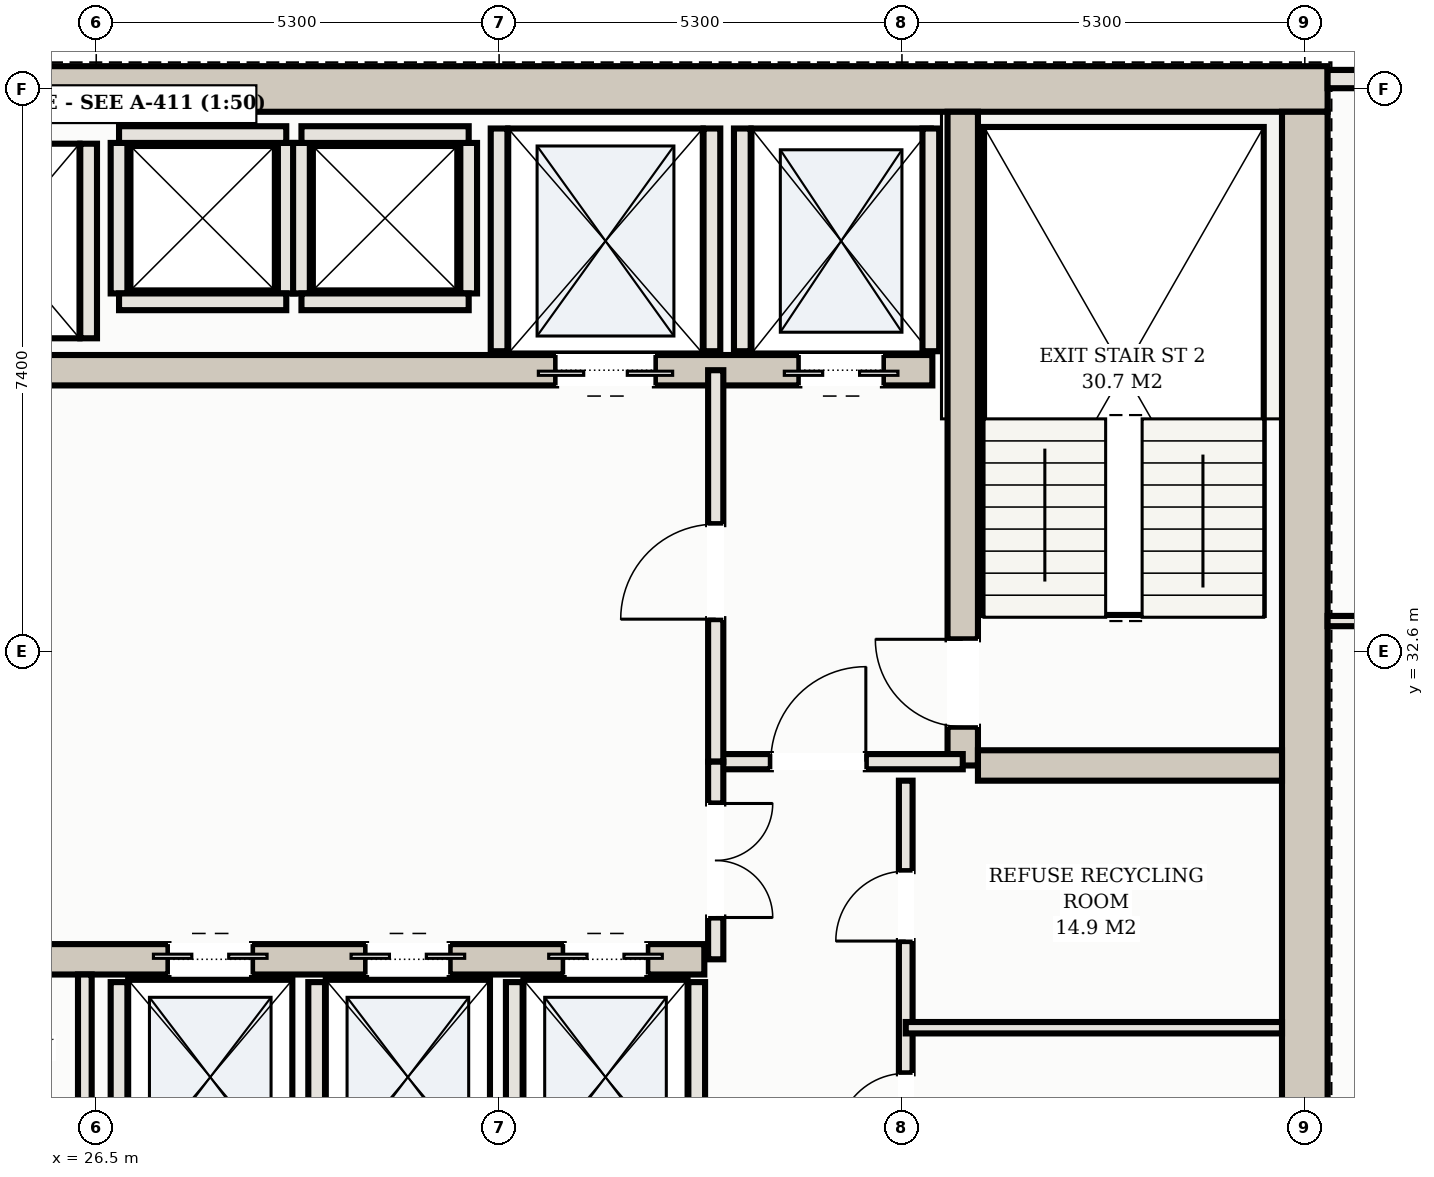
"""IFC4 building model, lengths in metres.
Left out: names, types, materials, properties, quantities, classifications, styles, units other than length and angle.
Written with IfcOpenShell. Run it as: python <this file> out.ifc"""

import sys

from ifc_helpers import new_model, si_unit, direction, frame, frame_2d, origin, place, context, subcontext, project, spatial, rectangle, extrude, element, fill, save


model = new_model("IFC4")
c1 = context("Model", 3, precision=1e-05, world=origin(), true_north=direction((0.0, 1.0)))
c2 = subcontext(c1, "Body", "Model", "MODEL_VIEW")
j1 = project(units=[si_unit("LENGTHUNIT", "METRE"), si_unit("PLANEANGLEUNIT", "RADIAN")], contexts=[c1])
p1 = place(None, origin())
s1 = spatial("IfcSite", under=j1, at=p1, CompositionType="ELEMENT")
p2 = place(p1, origin())
s2 = spatial("IfcBuilding", under=s1, at=p2, CompositionType="ELEMENT")
p3 = place(p2, frame((0.0, 0.0, 182.1)))
s3 = spatial("IfcBuildingStorey", under=s2, at=p3, CompositionType="ELEMENT", Elevation=182.1)
p4 = place(p3, frame((10.3, 40.0, 0.0), z_axis=(0.0, 0.0, 1.0), x_axis=(1.0, 0.0, 0.0)))
e1 = element("IfcWall", 1, at=p4, inside=s3, PredefinedType="SHEAR", context=c2, shape_type="SweptSolid", body=[
    extrude(rectangle(XDim=32.4, YDim=0.6, at=frame_2d((16.2, 0.0))), origin(), (0.0, 0.0, 1.0), 3.03),
])
p5 = place(p3, frame((42.4, 25.5, 0.0), z_axis=(0.0, 0.0, 1.0), x_axis=(0.0, 1.0, 0.0)))
e2 = element("IfcWall", 2, at=p5, inside=s3, PredefinedType="SHEAR", context=c2, shape_type="SweptSolid", body=[
    extrude(rectangle(XDim=14.2, YDim=0.6, at=frame_2d((7.1, 0.0))), origin(), (0.0, 0.0, 1.0), 3.03),
])
p6 = place(p3, frame((37.9, 31.1, 0.0), z_axis=(0.0, 0.0, 1.0), x_axis=(0.0, 1.0, 0.0)))
e3 = element("IfcWall", 3, at=p6, inside=s3, PredefinedType="SHEAR", context=c2, shape_type="SweptSolid", body=[
    extrude(rectangle(XDim=8.6, YDim=0.4, at=frame_2d((4.3, 0.0))), origin(), (0.0, 0.0, 1.0), 3.03),
])
p7 = place(p6, frame((0.51, 0.0, 0.0)))
e4 = element("IfcOpeningElement", 4, at=p7, cuts=e3, PredefinedType="OPENING", context=c2, shape_type="SweptSolid", body=[
    extrude(rectangle(XDim=1.15, YDim=2.2, at=frame_2d((0.575, 1.1))), frame((0.0, 0.21, 0.0), z_axis=(0.0, -1.0, 0.0), x_axis=(1.0, 0.0, 0.0)), (0.0, 0.0, 1.0), 0.42),
])
p8 = place(p3, frame((38.1, 31.1, 0.0), z_axis=(0.0, 0.0, 1.0), x_axis=(1.0, 0.0, 0.0)))
e5 = element("IfcWall", 5, at=p8, inside=s3, PredefinedType="SHEAR", context=c2, shape_type="SweptSolid", body=[
    extrude(rectangle(XDim=4.0, YDim=0.4, at=frame_2d((2.0, 0.0))), origin(), (0.0, 0.0, 1.0), 3.03),
])
p9 = place(p3, frame((15.5, 36.3, 0.0), z_axis=(0.0, 0.0, 1.0), x_axis=(1.0, 0.0, 0.0)))
e6 = element("IfcWall", 6, at=p9, inside=s3, PredefinedType="SHEAR", context=c2, shape_type="SweptSolid", body=[
    extrude(rectangle(XDim=22.0, YDim=0.4, at=frame_2d((11.0, 0.0))), origin(), (0.0, 0.0, 1.0), 3.03),
])
p10 = place(p9, frame((0.65, 0.0, 0.0)))
e7 = element("IfcOpeningElement", 7, at=p10, cuts=e6, PredefinedType="OPENING", context=c2, shape_type="SweptSolid", body=[
    extrude(rectangle(XDim=1.1, YDim=2.15, at=frame_2d((0.55, 1.075))), frame((0.0, 0.21, 0.0), z_axis=(0.0, -1.0, 0.0), x_axis=(1.0, 0.0, 0.0)), (0.0, 0.0, 1.0), 0.42),
])
p11 = place(p9, frame((20.25, 0.0, 0.0)))
e8 = element("IfcOpeningElement", 8, at=p11, cuts=e6, PredefinedType="OPENING", context=c2, shape_type="SweptSolid", body=[
    extrude(rectangle(XDim=1.1, YDim=2.15, at=frame_2d((0.55, 1.075))), frame((0.0, 0.21, 0.0), z_axis=(0.0, -1.0, 0.0), x_axis=(1.0, 0.0, 0.0)), (0.0, 0.0, 1.0), 0.42),
])
p12 = place(p9, frame((17.05, 0.0, 0.0)))
e9 = element("IfcOpeningElement", 9, at=p12, cuts=e6, PredefinedType="OPENING", context=c2, shape_type="SweptSolid", body=[
    extrude(rectangle(XDim=1.3, YDim=2.2, at=frame_2d((0.65, 1.1))), frame((0.0, 0.21, 0.0), z_axis=(0.0, -1.0, 0.0), x_axis=(1.0, 0.0, 0.0)), (0.0, 0.0, 1.0), 0.42),
])
p13 = place(p3, frame((18.5, 28.55, 0.0), z_axis=(0.0, 0.0, 1.0), x_axis=(1.0, 0.0, 0.0)))
e10 = element("IfcWall", 10, at=p13, inside=s3, PredefinedType="SHEAR", context=c2, shape_type="SweptSolid", body=[
    extrude(rectangle(XDim=16.0, YDim=0.4, at=frame_2d((8.0, 0.0))), origin(), (0.0, 0.0, 1.0), 3.03),
])
p14 = place(p13, frame((8.95, 0.0, 0.0)))
e11 = element("IfcOpeningElement", 11, at=p14, cuts=e10, PredefinedType="OPENING", context=c2, shape_type="SweptSolid", body=[
    extrude(rectangle(XDim=1.1, YDim=2.15, at=frame_2d((0.55, 1.075))), frame((0.0, 0.21, 0.0), z_axis=(0.0, -1.0, 0.0), x_axis=(1.0, 0.0, 0.0)), (0.0, 0.0, 1.0), 0.42),
])
p15 = place(p13, frame((11.55, 0.0, 0.0)))
e12 = element("IfcOpeningElement", 12, at=p15, cuts=e10, PredefinedType="OPENING", context=c2, shape_type="SweptSolid", body=[
    extrude(rectangle(XDim=1.1, YDim=2.15, at=frame_2d((0.55, 1.075))), frame((0.0, 0.21, 0.0), z_axis=(0.0, -1.0, 0.0), x_axis=(1.0, 0.0, 0.0)), (0.0, 0.0, 1.0), 0.42),
])
p16 = place(p13, frame((14.15, 0.0, 0.0)))
e13 = element("IfcOpeningElement", 13, at=p16, cuts=e10, PredefinedType="OPENING", context=c2, shape_type="SweptSolid", body=[
    extrude(rectangle(XDim=1.1, YDim=2.15, at=frame_2d((0.55, 1.075))), frame((0.0, 0.21, 0.0), z_axis=(0.0, -1.0, 0.0), x_axis=(1.0, 0.0, 0.0)), (0.0, 0.0, 1.0), 0.42),
])
for number, where, z_axis, x_axis in (
    (14, (35.0, 36.55, 0.0), (0.0, 0.0, 1.0), (0.0, 1.0, 0.0)),
    (15, (37.48, 36.55, 0.0), (0.0, 0.0, 1.0), (0.0, 1.0, 0.0)),
    (16, (31.8, 36.55, 0.0), (0.0, 0.0, 1.0), (0.0, 1.0, 0.0)),
    (17, (34.6, 36.55, 0.0), (0.0, 0.0, 1.0), (0.0, 1.0, 0.0)),
):
    element("IfcWall", number, at=place(p3, frame(where, z_axis=z_axis, x_axis=x_axis)), inside=s3, PredefinedType="SOLIDWALL", context=c2, shape_type="SweptSolid", body=[
        extrude(rectangle(XDim=2.93, YDim=0.22, at=frame_2d((1.465, 0.0))), origin(), (0.0, 0.0, 1.0), 3.03),
    ])
for number, where, z_axis, x_axis in (
    (18, (26.8, 25.72, 0.0), (0.0, 0.0, 1.0), (0.0, 1.0, 0.0)),
    (19, (29.4, 25.72, 0.0), (0.0, 0.0, 1.0), (0.0, 1.0, 0.0)),
    (20, (32.0, 25.72, 0.0), (0.0, 0.0, 1.0), (0.0, 1.0, 0.0)),
    (21, (34.4, 25.72, 0.0), (0.0, 0.0, 1.0), (0.0, 1.0, 0.0)),
):
    element("IfcWall", number, at=place(p3, frame(where, z_axis=z_axis, x_axis=x_axis)), inside=s3, PredefinedType="SOLIDWALL", context=c2, shape_type="SweptSolid", body=[
        extrude(rectangle(XDim=2.53, YDim=0.22, at=frame_2d((1.265, 0.0))), origin(), (0.0, 0.0, 1.0), 3.03),
    ])
p17 = place(p3, frame((26.4, 36.72, 0.0), z_axis=(0.0, 0.0, 1.0), x_axis=(0.0, 1.0, 0.0)))
e22 = element("IfcWall", 22, at=p17, inside=s3, PredefinedType="SOLIDWALL", context=c2, shape_type="SweptSolid", body=[
    extrude(rectangle(XDim=2.56, YDim=0.22, at=frame_2d((1.28, 0.0))), origin(), (0.0, 0.0, 1.0), 3.03),
])
for number, where, z_axis, x_axis in (
    (23, (26.8, 37.31, 0.0), (0.0, 0.0, 1.0), (0.0, 1.0, 0.0)),
    (24, (29.0, 37.31, 0.0), (0.0, 0.0, 1.0), (0.0, 1.0, 0.0)),
):
    element("IfcWall", number, at=place(p3, frame(where, z_axis=z_axis, x_axis=x_axis)), inside=s3, PredefinedType="SOLIDWALL", context=c2, shape_type="SweptSolid", body=[
        extrude(rectangle(XDim=1.98, YDim=0.22, at=frame_2d((0.99, 0.0))), origin(), (0.0, 0.0, 1.0), 3.03),
    ])
for number, where, z_axis, x_axis in (
    (25, (26.8, 39.4, 0.0), (0.0, 0.0, 1.0), (1.0, 0.0, 0.0)),
    (26, (26.8, 37.2, 0.0), (0.0, 0.0, 1.0), (1.0, 0.0, 0.0)),
):
    element("IfcWall", number, at=place(p3, frame(where, z_axis=z_axis, x_axis=x_axis)), inside=s3, PredefinedType="SOLIDWALL", context=c2, shape_type="SweptSolid", body=[
        extrude(rectangle(XDim=2.2, YDim=0.22, at=frame_2d((1.1, 0.0))), origin(), (0.0, 0.0, 1.0), 3.03),
    ])
for number, where, z_axis, x_axis in (
    (27, (29.2, 37.31, 0.0), (0.0, 0.0, 1.0), (0.0, 1.0, 0.0)),
    (28, (31.4, 37.31, 0.0), (0.0, 0.0, 1.0), (0.0, 1.0, 0.0)),
):
    element("IfcWall", number, at=place(p3, frame(where, z_axis=z_axis, x_axis=x_axis)), inside=s3, PredefinedType="SOLIDWALL", context=c2, shape_type="SweptSolid", body=[
        extrude(rectangle(XDim=1.98, YDim=0.22, at=frame_2d((0.99, 0.0))), origin(), (0.0, 0.0, 1.0), 3.03),
    ])
for number, where, z_axis, x_axis in (
    (29, (29.2, 39.4, 0.0), (0.0, 0.0, 1.0), (1.0, 0.0, 0.0)),
    (30, (29.2, 37.2, 0.0), (0.0, 0.0, 1.0), (1.0, 0.0, 0.0)),
):
    element("IfcWall", number, at=place(p3, frame(where, z_axis=z_axis, x_axis=x_axis)), inside=s3, PredefinedType="SOLIDWALL", context=c2, shape_type="SweptSolid", body=[
        extrude(rectangle(XDim=2.2, YDim=0.22, at=frame_2d((1.1, 0.0))), origin(), (0.0, 0.0, 1.0), 3.03),
    ])
p18 = place(p3, frame((44.35, 40.13, 0.0), z_axis=(0.0, 0.0, 1.0), x_axis=(-1.0, 0.0, 0.0)))
e31 = element("IfcWall", 31, at=p18, inside=s3, PredefinedType="SOLIDWALL", context=c2, shape_type="SweptSolid", body=[
    extrude(rectangle(XDim=1.65, YDim=0.24, at=frame_2d((0.825, 0.0))), origin(), (0.0, 0.0, 1.0), 3.03),
])
p19 = place(p3, frame((34.65, 31.15, 0.0), z_axis=(0.0, 0.0, 1.0), x_axis=(1.0, 0.0, 0.0)))
e32 = element("IfcWall", 32, at=p19, inside=s3, PredefinedType="PARTITIONING", context=c2, shape_type="SweptSolid", body=[
    extrude(rectangle(XDim=3.25, YDim=0.2, at=frame_2d((1.625, 0.0))), origin(), (0.0, 0.0, 1.0), 2.57),
])
p20 = place(p19, frame((0.725, 0.0, 0.0)))
e33 = element("IfcOpeningElement", 33, at=p20, cuts=e32, PredefinedType="OPENING", context=c2, shape_type="SweptSolid", body=[
    extrude(rectangle(XDim=1.25, YDim=2.2, at=frame_2d((0.625, 1.1))), frame((0.0, 0.11, 0.0), z_axis=(0.0, -1.0, 0.0), x_axis=(1.0, 0.0, 0.0)), (0.0, 0.0, 1.0), 0.22),
])
p21 = place(p3, frame((34.65, 31.15, 0.0), z_axis=(0.0, 0.0, 1.0), x_axis=(0.0, 1.0, 0.0)))
e34 = element("IfcWall", 34, at=p21, inside=s3, PredefinedType="PARTITIONING", context=c2, shape_type="SweptSolid", body=[
    extrude(rectangle(XDim=5.15, YDim=0.2, at=frame_2d((2.575, 0.0))), origin(), (0.0, 0.0, 1.0), 2.57),
])
p22 = place(p21, frame((1.875, 0.0, 0.0)))
e35 = element("IfcOpeningElement", 35, at=p22, cuts=e34, PredefinedType="OPENING", context=c2, shape_type="SweptSolid", body=[
    extrude(rectangle(XDim=1.25, YDim=2.2, at=frame_2d((0.625, 1.1))), frame((0.0, 0.11, 0.0), z_axis=(0.0, -1.0, 0.0), x_axis=(1.0, 0.0, 0.0)), (0.0, 0.0, 1.0), 0.22),
])
p23 = place(p3, frame((37.15, 25.5, 0.0), z_axis=(0.0, 0.0, 1.0), x_axis=(0.0, 1.0, 0.0)))
e36 = element("IfcWall", 36, at=p23, inside=s3, PredefinedType="PARTITIONING", context=c2, shape_type="SweptSolid", body=[
    extrude(rectangle(XDim=5.4, YDim=0.18, at=frame_2d((2.7, 0.0))), origin(), (0.0, 0.0, 1.0), 2.57),
])
p24 = place(p23, frame((0.65, 0.0, 0.0)))
e37 = element("IfcOpeningElement", 37, at=p24, cuts=e36, PredefinedType="OPENING", context=c2, shape_type="SweptSolid", body=[
    extrude(rectangle(XDim=0.9, YDim=2.15, at=frame_2d((0.45, 1.075))), frame((0.0, 0.1, 0.0), z_axis=(0.0, -1.0, 0.0), x_axis=(1.0, 0.0, 0.0)), (0.0, 0.0, 1.0), 0.2),
])
p25 = place(p23, frame((3.29, 0.0, 0.0)))
e38 = element("IfcOpeningElement", 38, at=p25, cuts=e36, PredefinedType="OPENING", context=c2, shape_type="SweptSolid", body=[
    extrude(rectangle(XDim=0.92, YDim=2.15, at=frame_2d((0.46, 1.075))), frame((0.0, 0.1, 0.0), z_axis=(0.0, -1.0, 0.0), x_axis=(1.0, 0.0, 0.0)), (0.0, 0.0, 1.0), 0.2),
])
p26 = place(p3, frame((37.15, 27.65, 0.0), z_axis=(0.0, 0.0, 1.0), x_axis=(1.0, 0.0, 0.0)))
e39 = element("IfcWall", 39, at=p26, inside=s3, PredefinedType="PARTITIONING", context=c2, shape_type="SweptSolid", body=[
    extrude(rectangle(XDim=4.95, YDim=0.15, at=frame_2d((2.475, 0.0))), origin(), (0.0, 0.0, 1.0), 2.57),
])
p27 = place(p3, frame((34.65, 28.55, 0.0), z_axis=(0.0, 0.0, 1.0), x_axis=(0.0, 1.0, 0.0)))
e40 = element("IfcWall", 40, at=p27, inside=s3, PredefinedType="PARTITIONING", context=c2, shape_type="SweptSolid", body=[
    extrude(rectangle(XDim=2.6, YDim=0.2, at=frame_2d((1.3, 0.0))), origin(), (0.0, 0.0, 1.0), 2.57),
])
p28 = place(p27, frame((0.55, 0.0, 0.0)))
e41 = element("IfcOpeningElement", 41, at=p28, cuts=e40, PredefinedType="OPENING", context=c2, shape_type="SweptSolid", body=[
    extrude(rectangle(XDim=1.5, YDim=2.25, at=frame_2d((0.75, 1.125))), frame((0.0, 0.11, 0.0), z_axis=(0.0, -1.0, 0.0), x_axis=(1.0, 0.0, 0.0)), (0.0, 0.0, 1.0), 0.22),
])
p29 = place(p3, frame((26.35, 25.62, 0.0), z_axis=(0.0, 0.0, 1.0), x_axis=(0.0, 1.0, 0.0)))
e42 = element("IfcWall", 42, at=p29, inside=s3, PredefinedType="PARTITIONING", context=c2, shape_type="SweptSolid", body=[
    extrude(rectangle(XDim=2.73, YDim=0.18, at=frame_2d((1.365, 0.0))), origin(), (0.0, 0.0, 1.0), 2.57),
])
p30 = place(p3, frame((42.7, 33.0, 0.0), z_axis=(0.0, 0.0, 1.0), x_axis=(1.0, 0.0, 0.0)))
e43 = element("IfcWall", 43, at=p30, inside=s3, PredefinedType="PARTITIONING", context=c2, shape_type="SweptSolid", body=[
    extrude(rectangle(XDim=5.98, YDim=0.135, at=frame_2d((2.99, 0.0))), origin(), (0.0, 0.0, 1.0), 2.57),
])
p31 = place(p30, frame((2.53, 0.0, 0.0)))
e44 = element("IfcOpeningElement", 44, at=p31, cuts=e43, PredefinedType="OPENING", context=c2, shape_type="SweptSolid", body=[
    extrude(rectangle(XDim=0.92, YDim=2.15, at=frame_2d((0.46, 1.075))), frame((0.0, 0.078, 0.0), z_axis=(0.0, -1.0, 0.0), x_axis=(1.0, 0.0, 0.0)), (0.0, 0.0, 1.0), 0.155),
])
p32 = place(p11, frame((1.1, 0.0, 0.0), z_axis=(0.0, 0.0, 1.0), x_axis=(-1.0, 0.0, 0.0)))
e45 = element("IfcDoor", 45, at=p32, inside=s3, OperationType="DOUBLE_DOOR_SLIDING", PredefinedType="DOOR", context=c2, shape_type="SweptSolid", body=[
    extrude(rectangle(XDim=1.1, YDim=2.15, at=frame_2d((0.55, 1.075))), frame((0.0, 0.025, 0.0), z_axis=(0.0, -1.0, 0.0), x_axis=(1.0, 0.0, 0.0)), (0.0, 0.0, 1.0), 0.05),
])
fill(e8, e45)
p33 = place(p12, frame((1.3, 0.0, 0.0), z_axis=(0.0, 0.0, 1.0), x_axis=(-1.0, 0.0, 0.0)))
e46 = element("IfcDoor", 46, at=p33, inside=s3, OperationType="DOUBLE_DOOR_SLIDING", PredefinedType="DOOR", context=c2, shape_type="SweptSolid", body=[
    extrude(rectangle(XDim=1.3, YDim=2.2, at=frame_2d((0.65, 1.1))), frame((0.0, 0.025, 0.0), z_axis=(0.0, -1.0, 0.0), x_axis=(1.0, 0.0, 0.0)), (0.0, 0.0, 1.0), 0.05),
])
fill(e9, e46)
p34 = place(p14, origin())
e47 = element("IfcDoor", 47, at=p34, inside=s3, OperationType="DOUBLE_DOOR_SLIDING", PredefinedType="DOOR", context=c2, shape_type="SweptSolid", body=[
    extrude(rectangle(XDim=1.1, YDim=2.15, at=frame_2d((0.55, 1.075))), frame((0.0, 0.025, 0.0), z_axis=(0.0, -1.0, 0.0), x_axis=(1.0, 0.0, 0.0)), (0.0, 0.0, 1.0), 0.05),
])
fill(e11, e47)
p35 = place(p15, origin())
e48 = element("IfcDoor", 48, at=p35, inside=s3, OperationType="DOUBLE_DOOR_SLIDING", PredefinedType="DOOR", context=c2, shape_type="SweptSolid", body=[
    extrude(rectangle(XDim=1.1, YDim=2.15, at=frame_2d((0.55, 1.075))), frame((0.0, 0.025, 0.0), z_axis=(0.0, -1.0, 0.0), x_axis=(1.0, 0.0, 0.0)), (0.0, 0.0, 1.0), 0.05),
])
fill(e12, e48)
p36 = place(p16, origin())
e49 = element("IfcDoor", 49, at=p36, inside=s3, OperationType="DOUBLE_DOOR_SLIDING", PredefinedType="DOOR", context=c2, shape_type="SweptSolid", body=[
    extrude(rectangle(XDim=1.1, YDim=2.15, at=frame_2d((0.55, 1.075))), frame((0.0, 0.025, 0.0), z_axis=(0.0, -1.0, 0.0), x_axis=(1.0, 0.0, 0.0)), (0.0, 0.0, 1.0), 0.05),
])
fill(e13, e49)
p37 = place(p20, origin())
e50 = element("IfcDoor", 50, at=p37, inside=s3, OperationType="SINGLE_SWING_RIGHT", PredefinedType="DOOR", context=c2, shape_type="SweptSolid", body=[
    extrude(rectangle(XDim=1.25, YDim=2.2, at=frame_2d((0.625, 1.1))), frame((0.0, 0.025, 0.0), z_axis=(0.0, -1.0, 0.0), x_axis=(1.0, 0.0, 0.0)), (0.0, 0.0, 1.0), 0.05),
])
fill(e33, e50)
p38 = place(p22, origin())
e51 = element("IfcDoor", 51, at=p38, inside=s3, OperationType="SINGLE_SWING_LEFT", PredefinedType="DOOR", context=c2, shape_type="SweptSolid", body=[
    extrude(rectangle(XDim=1.25, YDim=2.2, at=frame_2d((0.625, 1.1))), frame((0.0, 0.025, 0.0), z_axis=(0.0, -1.0, 0.0), x_axis=(1.0, 0.0, 0.0)), (0.0, 0.0, 1.0), 0.05),
])
fill(e35, e51)
p39 = place(p7, origin())
e52 = element("IfcDoor", 52, at=p39, inside=s3, OperationType="SINGLE_SWING_RIGHT", PredefinedType="DOOR", context=c2, shape_type="SweptSolid", body=[
    extrude(rectangle(XDim=1.15, YDim=2.2, at=frame_2d((0.575, 1.1))), frame((0.0, 0.025, 0.0), z_axis=(0.0, -1.0, 0.0), x_axis=(1.0, 0.0, 0.0)), (0.0, 0.0, 1.0), 0.05),
])
fill(e4, e52)
p40 = place(p24, origin())
e53 = element("IfcDoor", 53, at=p40, inside=s3, OperationType="SINGLE_SWING_LEFT", PredefinedType="DOOR", context=c2, shape_type="SweptSolid", body=[
    extrude(rectangle(XDim=0.9, YDim=2.15, at=frame_2d((0.45, 1.075))), frame((0.0, 0.025, 0.0), z_axis=(0.0, -1.0, 0.0), x_axis=(1.0, 0.0, 0.0)), (0.0, 0.0, 1.0), 0.05),
])
fill(e37, e53)
p41 = place(p25, origin())
e54 = element("IfcDoor", 54, at=p41, inside=s3, OperationType="SINGLE_SWING_LEFT", PredefinedType="DOOR", context=c2, shape_type="SweptSolid", body=[
    extrude(rectangle(XDim=0.92, YDim=2.15, at=frame_2d((0.46, 1.075))), frame((0.0, 0.025, 0.0), z_axis=(0.0, -1.0, 0.0), x_axis=(1.0, 0.0, 0.0)), (0.0, 0.0, 1.0), 0.05),
])
fill(e38, e54)
p42 = place(p28, frame((1.5, 0.0, 0.0), z_axis=(0.0, 0.0, 1.0), x_axis=(-1.0, 0.0, 0.0)))
e55 = element("IfcDoor", 55, at=p42, inside=s3, OperationType="DOUBLE_DOOR_SINGLE_SWING", PredefinedType="DOOR", context=c2, shape_type="SweptSolid", body=[
    extrude(rectangle(XDim=1.5, YDim=2.25, at=frame_2d((0.75, 1.125))), frame((0.0, 0.025, 0.0), z_axis=(0.0, -1.0, 0.0), x_axis=(1.0, 0.0, 0.0)), (0.0, 0.0, 1.0), 0.05),
])
fill(e41, e55)
save(model, sys.argv[1])
